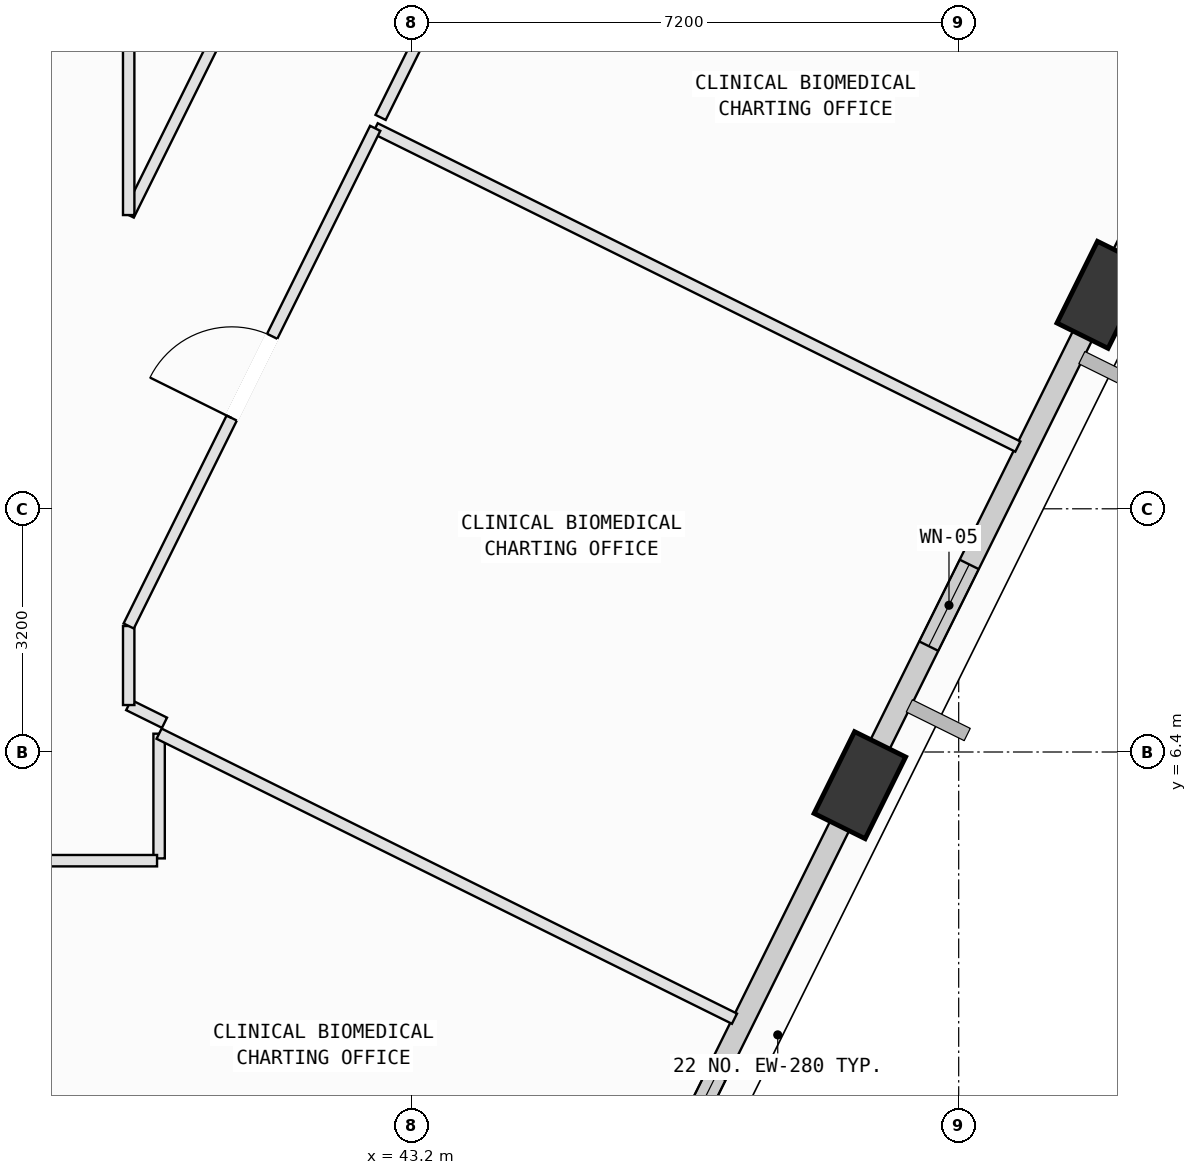
"""IFC4 building model, lengths in metres.
Left out: names, types, materials, properties, quantities, classifications, styles, units other than length and angle.
Written with IfcOpenShell. Run it as: python <this file> out.ifc"""

import sys

from ifc_helpers import new_model, si_unit, direction, frame, frame_2d, origin, origin_2d, place, context, subcontext, project, spatial, rectangle, extrude, element, fill, save


model = new_model("IFC4")
c1 = context("Model", 3, precision=1e-05, world=origin(), true_north=direction((0.0, 1.0)))
c2 = subcontext(c1, "Body", "Model", "MODEL_VIEW")
j1 = project(units=[si_unit("LENGTHUNIT", "METRE"), si_unit("PLANEANGLEUNIT", "RADIAN")], contexts=[c1])
p1 = place(None, origin())
s1 = spatial("IfcSite", under=j1, at=p1, CompositionType="ELEMENT")
p2 = place(p1, origin())
s2 = spatial("IfcBuilding", under=s1, at=p2, CompositionType="ELEMENT")
p3 = place(p2, frame((0.0, 0.0, 296.6)))
s3 = spatial("IfcBuildingStorey", under=s2, at=p3, CompositionType="ELEMENT", Elevation=296.6)
p4 = place(p3, frame((49.1, 5.963, 0.002), z_axis=(0.077131475637, 0.064549745568, 0.99492917628), x_axis=(-0.968577719941, -0.231806306973, 0.090127889585)))
e1 = element("IfcColumn", 1, at=p4, inside=s3, PredefinedType="COLUMN", context=c2, shape_type="SweptSolid", body=[
    extrude(rectangle(XDim=1.2, YDim=0.75, at=origin_2d()), origin(), (0.0, 0.0, 1.0), 4.017),
])
p5 = place(p3, frame((52.295, 12.415, 0.002), z_axis=(0.050487772737, 0.077617347004, 0.995704038481), x_axis=(-0.858579021169, -0.505922543013, 0.082972554979)))
e2 = element("IfcColumn", 2, at=p5, inside=s3, PredefinedType="COLUMN", context=c2, shape_type="SweptSolid", body=[
    extrude(rectangle(XDim=1.2, YDim=0.75, at=origin_2d()), origin(), (0.0, 0.0, 1.0), 4.014),
])
p6 = place(p3, frame((49.009, 5.781, 0.0), z_axis=(0.0, 0.0, 1.0), x_axis=(-0.443828128094, -0.896111930906, 0.0)))
e3 = element("IfcWall", 3, at=p6, inside=s3, PredefinedType="SOLIDWALL", context=c2, shape_type="SweptSolid", body=[
    extrude(rectangle(XDim=6.439, YDim=0.28, at=frame_2d((3.219, 0.0))), origin(), (0.0, 0.0, 1.0), 3.265),
])
p7 = place(p6, frame((4.058, 0.0, 0.75)))
e4 = element("IfcOpeningElement", 4, at=p7, cuts=e3, PredefinedType="OPENING", context=c2, shape_type="SweptSolid", body=[
    extrude(rectangle(XDim=1.8, YDim=2.05, at=frame_2d((0.9, 1.025))), frame((0.0, 0.15, 0.0), z_axis=(0.0, -1.0, 0.0), x_axis=(1.0, 0.0, 0.0)), (0.0, 0.0, 1.0), 0.3),
])
p8 = place(p3, frame((52.201, 12.225, 0.0), z_axis=(0.0, 0.0, 1.0), x_axis=(-0.443860567831, -0.896095863357, 0.0)))
e5 = element("IfcWall", 5, at=p8, inside=s3, PredefinedType="SOLIDWALL", context=c2, shape_type="SweptSolid", body=[
    extrude(rectangle(XDim=6.414, YDim=0.28, at=frame_2d((3.207, 0.0))), origin(), (0.0, 0.0, 1.0), 3.265),
])
p9 = place(p8, frame((3.746, 0.0, 0.75)))
e6 = element("IfcOpeningElement", 6, at=p9, cuts=e5, PredefinedType="OPENING", context=c2, shape_type="SweptSolid", body=[
    extrude(rectangle(XDim=1.2, YDim=1.75, at=frame_2d((0.6, 0.875))), frame((0.0, 0.15, 0.0), z_axis=(0.0, -1.0, 0.0), x_axis=(1.0, 0.0, 0.0)), (0.0, 0.0, 1.0), 0.3),
])
p10 = place(p3, frame((55.397, 18.677, 0.0), z_axis=(0.0, 0.0, 1.0), x_axis=(-0.443826536777, -0.896112719055, 0.0)))
e7 = element("IfcWall", 7, at=p10, inside=s3, PredefinedType="SOLIDWALL", context=c2, shape_type="SweptSolid", body=[
    extrude(rectangle(XDim=6.407, YDim=0.28, at=frame_2d((3.203, 0.0))), origin(), (0.0, 0.0, 1.0), 3.265),
])
p11 = place(p10, frame((0.852, 0.0, 0.75)))
e8 = element("IfcOpeningElement", 8, at=p11, cuts=e7, PredefinedType="OPENING", context=c2, shape_type="SweptSolid", body=[
    extrude(rectangle(XDim=1.6, YDim=1.95, at=frame_2d((0.8, 0.975))), frame((0.0, 0.15, 0.0), z_axis=(0.0, -1.0, 0.0), x_axis=(1.0, 0.0, 0.0)), (0.0, 0.0, 1.0), 0.3),
])
p12 = place(p3, frame((36.51, 2.061, 0.0), z_axis=(0.0, 0.0, 1.0), x_axis=(0.896077201475, -0.443898241715, 0.0)))
e9 = element("IfcWall", 9, at=p12, inside=s3, PredefinedType="PARTITIONING", context=c2, shape_type="SweptSolid", body=[
    extrude(rectangle(XDim=9.435, YDim=0.15, at=frame_2d((4.717, 0.0))), origin(), (0.0, 0.0, 1.0), 3.78),
])
p13 = place(p3, frame((39.88, 5.0, 0.0), z_axis=(0.0, 0.0, 1.0), x_axis=(0.0, 1.0, 0.0)))
e10 = element("IfcWall", 10, at=p13, inside=s3, PredefinedType="PARTITIONING", context=c2, shape_type="SweptSolid", body=[
    extrude(rectangle(XDim=1.641, YDim=0.15, at=frame_2d((0.821, 0.0))), origin(), (0.0, 0.0, 1.0), 3.78),
])
p14 = place(p3, frame((39.88, 6.641, 0.0), z_axis=(0.0, 0.0, 1.0), x_axis=(0.896079856491, -0.443892882114, 0.0)))
e11 = element("IfcWall", 11, at=p14, inside=s3, PredefinedType="PARTITIONING", context=c2, shape_type="SweptSolid", body=[
    extrude(rectangle(XDim=8.448, YDim=0.15, at=frame_2d((4.224, 0.0))), origin(), (0.0, 0.0, 1.0), 3.78),
])
p15 = place(p3, frame((37.95, 4.97, 0.0), z_axis=(0.0, 0.0, 1.0), x_axis=(1.0, 0.0, 0.0)))
e12 = element("IfcWall", 12, at=p15, inside=s3, PredefinedType="PARTITIONING", context=c2, shape_type="SweptSolid", body=[
    extrude(rectangle(XDim=1.903, YDim=0.15, at=frame_2d((0.952, 0.0))), origin(), (0.0, 0.0, 1.0), 3.78),
])
p16 = place(p3, frame((42.723, 14.606, 0.0), z_axis=(0.0, 0.0, 1.0), x_axis=(0.896138758432, -0.443773957817, 0.0)))
e13 = element("IfcWall", 13, at=p16, inside=s3, PredefinedType="PARTITIONING", context=c2, shape_type="SweptSolid", body=[
    extrude(rectangle(XDim=9.435, YDim=0.15, at=frame_2d((4.718, 0.0))), origin(), (0.0, 0.0, 1.0), 3.78),
])
p17 = place(p3, frame((49.56, 6.376, 0.0), z_axis=(0.0, 0.0, 1.0), x_axis=(-0.443568421542, -0.896240512034, 0.0)))
e14 = element("IfcWall", 14, at=p17, inside=s3, PredefinedType="PARTITIONING", context=c2, shape_type="SweptSolid", body=[
    extrude(rectangle(XDim=0.778, YDim=0.15, at=frame_2d((0.389, 0.0))), origin(), (0.0, 0.0, 1.0), 3.265),
])
p18 = place(p3, frame((39.951, 6.785, 0.0), z_axis=(0.0, 0.0, 1.0), x_axis=(-0.896185647089, 0.443679260223, 0.0)))
e15 = element("IfcWall", 15, at=p18, inside=s3, PredefinedType="PARTITIONING", context=c2, shape_type="SweptSolid", body=[
    extrude(rectangle(XDim=0.525, YDim=0.15, at=frame_2d((0.263, 0.0))), origin(), (0.0, 0.0, 1.0), 3.165),
])
p19 = place(p3, frame((39.48, 7.018, 0.0), z_axis=(0.0, 0.0, 1.0), x_axis=(0.0, 1.0, 0.0)))
e16 = element("IfcWall", 16, at=p19, inside=s3, PredefinedType="PARTITIONING", context=c2, shape_type="SweptSolid", body=[
    extrude(rectangle(XDim=1.04, YDim=0.15, at=frame_2d((0.52, 0.0))), origin(), (0.0, 0.0, 1.0), 3.78),
])
p20 = place(p3, frame((39.48, 8.058, 0.0), z_axis=(0.0, 0.0, 1.0), x_axis=(0.443815683985, 0.896118094142, 0.0)))
e17 = element("IfcWall", 17, at=p20, inside=s3, PredefinedType="PARTITIONING", context=c2, shape_type="SweptSolid", body=[
    extrude(rectangle(XDim=7.307, YDim=0.15, at=frame_2d((3.653, 0.0))), origin(), (0.0, 0.0, 1.0), 3.78),
])
p21 = place(p20, frame((3.053, 0.0, 0.0)))
e18 = element("IfcOpeningElement", 18, at=p21, cuts=e17, PredefinedType="OPENING", context=c2, shape_type="SweptSolid", body=[
    extrude(rectangle(XDim=1.2, YDim=2.15, at=frame_2d((0.6, 1.075))), frame((0.0, 0.085, 0.0), z_axis=(0.0, -1.0, 0.0), x_axis=(1.0, 0.0, 0.0)), (0.0, 0.0, 1.0), 0.17),
])
p22 = place(p3, frame((42.794, 14.75, 0.0), z_axis=(0.0, 0.0, 1.0), x_axis=(0.443907715055, 0.896072508514, 0.0)))
e19 = element("IfcWall", 19, at=p22, inside=s3, PredefinedType="PARTITIONING", context=c2, shape_type="SweptSolid", body=[
    extrude(rectangle(XDim=5.44, YDim=0.15, at=frame_2d((2.72, 0.0))), origin(), (0.0, 0.0, 1.0), 3.78),
])
p23 = place(p22, frame((2.12, 0.0, 0.0)))
e20 = element("IfcOpeningElement", 20, at=p23, cuts=e19, PredefinedType="OPENING", context=c2, shape_type="SweptSolid", body=[
    extrude(rectangle(XDim=1.2, YDim=2.15, at=frame_2d((0.6, 1.075))), frame((0.0, 0.085, 0.0), z_axis=(0.0, -1.0, 0.0), x_axis=(1.0, 0.0, 0.0)), (0.0, 0.0, 1.0), 0.17),
])
p24 = place(p3, frame((45.254, 19.603, 0.0), z_axis=(0.0, 0.0, 1.0), x_axis=(0.896085806874, -0.443880869963, 0.0)))
e21 = element("IfcWall", 21, at=p24, inside=s3, PredefinedType="PARTITIONING", context=c2, shape_type="SweptSolid", body=[
    extrude(rectangle(XDim=9.385, YDim=0.15, at=frame_2d((4.693, 0.0))), origin(), (0.0, 0.0, 1.0), 3.78),
])
p25 = place(p3, frame((52.76, 12.834, 0.0), z_axis=(0.0, 0.0, 1.0), x_axis=(-0.444751315026, -0.895654100522, 0.0)))
e22 = element("IfcWall", 22, at=p25, inside=s3, PredefinedType="PARTITIONING", context=c2, shape_type="SweptSolid", body=[
    extrude(rectangle(XDim=0.794, YDim=0.15, at=frame_2d((0.397, 0.0))), origin(), (0.0, 0.0, 1.0), 3.265),
])
p26 = place(p3, frame((44.509, 23.618, 0.0), z_axis=(0.0, 0.0, 1.0), x_axis=(-0.443866227597, -0.896093059899, 0.0)))
e23 = element("IfcWall", 23, at=p26, inside=s3, PredefinedType="PARTITIONING", context=c2, shape_type="SweptSolid", body=[
    extrude(rectangle(XDim=11.33, YDim=0.15, at=frame_2d((5.665, 0.0))), origin(), (0.0, 0.0, 1.0), 3.78),
])
p27 = place(p26, frame((5.065, 0.0, 0.0)))
e24 = element("IfcOpeningElement", 24, at=p27, cuts=e23, PredefinedType="OPENING", context=c2, shape_type="SweptSolid", body=[
    extrude(rectangle(XDim=1.2, YDim=2.15, at=frame_2d((0.6, 1.075))), frame((0.0, 0.085, 0.0), z_axis=(0.0, -1.0, 0.0), x_axis=(1.0, 0.0, 0.0)), (0.0, 0.0, 1.0), 0.17),
])
p28 = place(p3, frame((39.48, 13.465, 0.0), z_axis=(0.0, 0.0, 1.0), x_axis=(-0.000132078586, 0.999999991278, 0.0)))
e25 = element("IfcWall", 25, at=p28, inside=s3, PredefinedType="PARTITIONING", context=c2, shape_type="SweptSolid", body=[
    extrude(rectangle(XDim=7.394, YDim=0.15, at=frame_2d((3.697, 0.0))), origin(), (0.0, 0.0, 1.0), 3.78),
])
p29 = place(p7, origin())
e26 = element("IfcWindow", 26, at=p29, inside=s3, PartitioningType="SINGLE_PANEL", PredefinedType="WINDOW", context=c2, shape_type="SweptSolid", body=[
    extrude(rectangle(XDim=1.8, YDim=2.05, at=frame_2d((0.9, 1.025))), frame((0.0, 0.03, 0.0), z_axis=(0.0, -1.0, 0.0), x_axis=(1.0, 0.0, 0.0)), (0.0, 0.0, 1.0), 0.06),
])
fill(e4, e26)
p30 = place(p9, origin())
e27 = element("IfcWindow", 27, at=p30, inside=s3, PartitioningType="SINGLE_PANEL", PredefinedType="WINDOW", context=c2, shape_type="SweptSolid", body=[
    extrude(rectangle(XDim=1.2, YDim=1.75, at=frame_2d((0.6, 0.875))), frame((0.0, 0.03, 0.0), z_axis=(0.0, -1.0, 0.0), x_axis=(1.0, 0.0, 0.0)), (0.0, 0.0, 1.0), 0.06),
])
fill(e6, e27)
p31 = place(p21, origin())
e28 = element("IfcDoor", 28, at=p31, inside=s3, OperationType="SINGLE_SWING_LEFT", PredefinedType="DOOR", context=c2, shape_type="SweptSolid", body=[
    extrude(rectangle(XDim=1.2, YDim=2.15, at=frame_2d((0.6, 1.075))), frame((0.0, 0.025, 0.0), z_axis=(0.0, -1.0, 0.0), x_axis=(1.0, 0.0, 0.0)), (0.0, 0.0, 1.0), 0.05),
])
fill(e18, e28)
save(model, sys.argv[1])
